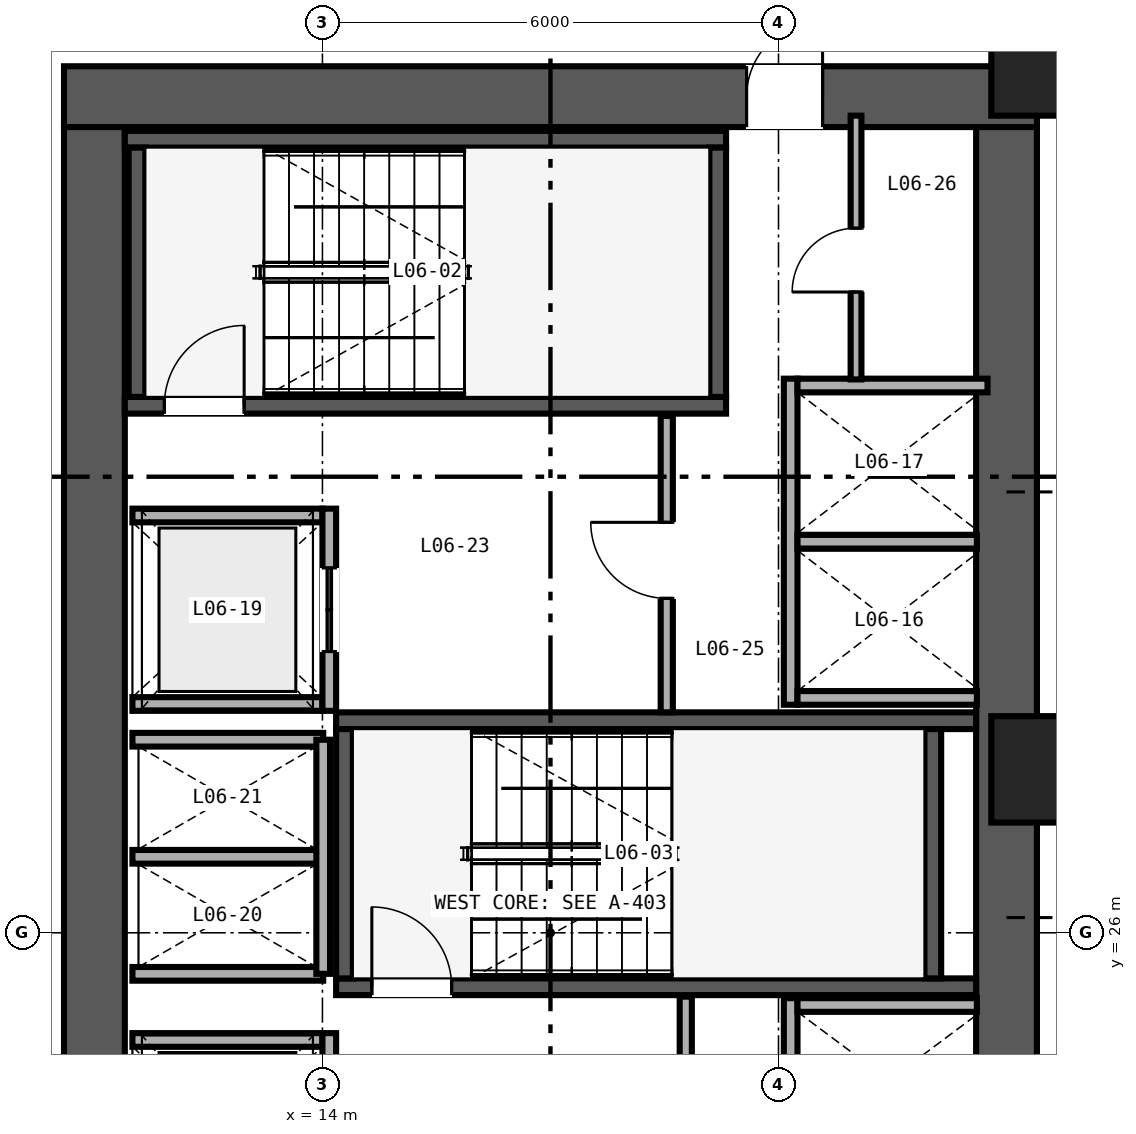
"""IFC4 building model, lengths in metres.
Left out: names, types, materials, properties, quantities, classifications, styles, units other than length and angle.
Written with IfcOpenShell. Run it as: python <this file> out.ifc"""

import sys

from ifc_helpers import new_model, si_unit, direction, frame, frame_2d, origin, origin_2d, place, context, subcontext, project, spatial, rectangle, extrude, source, transform, mapped, element, fill, save


model = new_model("IFC4")
c1 = context("Model", 3, precision=1e-05, world=origin(), true_north=direction((0.0, 1.0)))
c2 = subcontext(c1, "Body", "Model", "MODEL_VIEW")
j1 = project(units=[si_unit("LENGTHUNIT", "METRE"), si_unit("PLANEANGLEUNIT", "RADIAN")], contexts=[c1])
p1 = place(None, origin())
s1 = spatial("IfcSite", under=j1, at=p1, CompositionType="ELEMENT")
p2 = place(p1, origin())
s2 = spatial("IfcBuilding", under=s1, at=p2, CompositionType="ELEMENT")
p3 = place(p2, frame((0.0, 0.0, 28.8)))
s3 = spatial("IfcBuildingStorey", under=s2, at=p3, CompositionType="ELEMENT", Elevation=28.8)
p4 = place(p3, frame((10.6, 37.0, 0.0), z_axis=(0.0, 0.0, 1.0), x_axis=(1.0, 0.0, 0.0)))
e1 = element("IfcWall", 1, at=p4, inside=s3, PredefinedType="SHEAR", context=c2, shape_type="SweptSolid", body=[
    extrude(rectangle(XDim=12.8, YDim=0.8, at=frame_2d((6.4, 0.0))), origin(), (0.0, 0.0, 1.0), 5.75),
])
p5 = place(p4, frame((8.98, 0.0, 0.0)))
e2 = element("IfcOpeningElement", 2, at=p5, cuts=e1, PredefinedType="OPENING", context=c2, shape_type="SweptSolid", body=[
    extrude(rectangle(XDim=1.0, YDim=2.15, at=frame_2d((0.5, 1.075))), frame((0.0, 0.41, 0.0), z_axis=(0.0, -1.0, 0.0), x_axis=(1.0, 0.0, 0.0)), (0.0, 0.0, 1.0), 0.82),
])
for number, where, z_axis, x_axis in (
    (3, (11.0, 15.4, 0.0), (0.0, 0.0, 1.0), (0.0, 1.0, 0.0)),
    (4, (23.0, 15.4, 0.0), (0.0, 0.0, 1.0), (0.0, 1.0, 0.0)),
):
    element("IfcWall", number, at=place(p3, frame(where, z_axis=z_axis, x_axis=x_axis)), inside=s3, PredefinedType="SHEAR", context=c2, shape_type="SweptSolid", body=[
        extrude(rectangle(XDim=21.2, YDim=0.8, at=frame_2d((10.6, 0.0))), origin(), (0.0, 0.0, 1.0), 5.75),
    ])
p6 = place(p3, frame((11.4, 32.94, 0.0), z_axis=(0.0, 0.0, 1.0), x_axis=(1.0, 0.0, 0.0)))
e5 = element("IfcWall", 5, at=p6, inside=s3, PredefinedType="SHEAR", context=c2, shape_type="SweptSolid", body=[
    extrude(rectangle(XDim=7.91, YDim=0.22, at=frame_2d((3.955, 0.0))), origin(), (0.0, 0.0, 1.0), 5.8),
])
p7 = place(p6, frame((0.52, 0.0, 0.0)))
e6 = element("IfcOpeningElement", 6, at=p7, cuts=e5, PredefinedType="OPENING", context=c2, shape_type="SweptSolid", body=[
    extrude(rectangle(XDim=1.05, YDim=2.15, at=frame_2d((0.525, 1.075))), frame((0.0, 0.12, 0.0), z_axis=(0.0, -1.0, 0.0), x_axis=(1.0, 0.0, 0.0)), (0.0, 0.0, 1.0), 0.24),
])
p8 = place(p3, frame((11.4, 36.44, 0.0), z_axis=(0.0, 0.0, 1.0), x_axis=(1.0, 0.0, 0.0)))
e7 = element("IfcWall", 7, at=p8, inside=s3, PredefinedType="SHEAR", context=c2, shape_type="SweptSolid", body=[
    extrude(rectangle(XDim=7.91, YDim=0.22, at=frame_2d((3.955, 0.0))), origin(), (0.0, 0.0, 1.0), 5.8),
])
for number, where, z_axis, x_axis in (
    (8, (11.56, 33.05, 0.0), (0.0, 0.0, 1.0), (0.0, 1.0, 0.0)),
    (9, (19.2, 33.05, 0.0), (0.0, 0.0, 1.0), (0.0, 1.0, 0.0)),
):
    element("IfcWall", number, at=place(p3, frame(where, z_axis=z_axis, x_axis=x_axis)), inside=s3, PredefinedType="SHEAR", context=c2, shape_type="SweptSolid", body=[
        extrude(rectangle(XDim=3.28, YDim=0.22, at=frame_2d((1.64, 0.0))), origin(), (0.0, 0.0, 1.0), 5.8),
    ])
p9 = place(p3, frame((14.18, 25.29, 0.0), z_axis=(0.0, 0.0, 1.0), x_axis=(1.0, 0.0, 0.0)))
e10 = element("IfcWall", 10, at=p9, inside=s3, PredefinedType="SHEAR", context=c2, shape_type="SweptSolid", body=[
    extrude(rectangle(XDim=8.42, YDim=0.22, at=frame_2d((4.21, 0.0))), origin(), (0.0, 0.0, 1.0), 5.8),
])
p10 = place(p9, frame((0.47, 0.0, 0.0)))
e11 = element("IfcOpeningElement", 11, at=p10, cuts=e10, PredefinedType="OPENING", context=c2, shape_type="SweptSolid", body=[
    extrude(rectangle(XDim=1.05, YDim=2.15, at=frame_2d((0.525, 1.075))), frame((0.0, 0.12, 0.0), z_axis=(0.0, -1.0, 0.0), x_axis=(1.0, 0.0, 0.0)), (0.0, 0.0, 1.0), 0.24),
])
p11 = place(p3, frame((14.18, 28.79, 0.0), z_axis=(0.0, 0.0, 1.0), x_axis=(1.0, 0.0, 0.0)))
e12 = element("IfcWall", 12, at=p11, inside=s3, PredefinedType="SHEAR", context=c2, shape_type="SweptSolid", body=[
    extrude(rectangle(XDim=8.42, YDim=0.22, at=frame_2d((4.21, 0.0))), origin(), (0.0, 0.0, 1.0), 5.8),
])
for number, where, z_axis, x_axis in (
    (13, (14.29, 25.4, 0.0), (0.0, 0.0, 1.0), (0.0, 1.0, 0.0)),
    (14, (22.03, 25.4, 0.0), (0.0, 0.0, 1.0), (0.0, 1.0, 0.0)),
):
    element("IfcWall", number, at=place(p3, frame(where, z_axis=z_axis, x_axis=x_axis)), inside=s3, PredefinedType="SHEAR", context=c2, shape_type="SweptSolid", body=[
        extrude(rectangle(XDim=3.28, YDim=0.22, at=frame_2d((1.64, 0.0))), origin(), (0.0, 0.0, 1.0), 5.8),
    ])
m1 = source(origin(), c2, "Body", "SweptSolid", [
    extrude(rectangle(XDim=1.4, YDim=1.4, at=origin_2d()), origin(), (0.0, 0.0, 1.0), 5.75),
])
for number, where, z_axis, x_axis in (
    (15, (23.5, 28.15, 0.0), (0.0, 0.0, 1.0), (1.0, 0.0, 0.0)),
    (16, (23.5, 37.45, 0.0), (0.0, 0.0, 1.0), (1.0, 0.0, 0.0)),
):
    element("IfcColumn", number, at=place(p3, frame(where, z_axis=z_axis, x_axis=x_axis)), inside=s3, PredefinedType="COLUMN", context=c2, shape_type="MappedRepresentation", body=[
        mapped(m1, transform((0.0, 0.0, 0.0), scale=1.0)),
    ])
p12 = place(p3, frame((20.16, 18.82, 0.0), z_axis=(0.0, 0.0, 1.0), x_axis=(0.0, 1.0, 0.0)))
e17 = element("IfcWall", 17, at=p12, inside=s3, PredefinedType="SOLIDWALL", context=c2, shape_type="SweptSolid", body=[
    extrude(rectangle(XDim=6.32, YDim=0.18, at=frame_2d((3.16, 0.0))), origin(), (0.0, 0.0, 1.0), 4.65),
])
p13 = place(p3, frame((20.25, 25.05, 0.0), z_axis=(0.0, 0.0, 1.0), x_axis=(1.0, 0.0, 0.0)))
e18 = element("IfcWall", 18, at=p13, inside=s3, PredefinedType="SOLIDWALL", context=c2, shape_type="SweptSolid", body=[
    extrude(rectangle(XDim=2.36, YDim=0.18, at=frame_2d((1.18, 0.0))), origin(), (0.0, 0.0, 1.0), 5.75),
])
p14 = place(p3, frame((20.16, 29.0, 0.0), z_axis=(0.0, 0.0, 1.0), x_axis=(0.0, 1.0, 0.0)))
e19 = element("IfcWall", 19, at=p14, inside=s3, PredefinedType="SOLIDWALL", context=c2, shape_type="SweptSolid", body=[
    extrude(rectangle(XDim=4.29, YDim=0.18, at=frame_2d((2.145, 0.0))), origin(), (0.0, 0.0, 1.0), 5.75),
])
p15 = place(p3, frame((20.25, 29.09, 0.0), z_axis=(0.0, 0.0, 1.0), x_axis=(1.0, 0.0, 0.0)))
e20 = element("IfcWall", 20, at=p15, inside=s3, PredefinedType="SOLIDWALL", context=c2, shape_type="SweptSolid", body=[
    extrude(rectangle(XDim=2.36, YDim=0.18, at=frame_2d((1.18, 0.0))), origin(), (0.0, 0.0, 1.0), 5.75),
])
p16 = place(p3, frame((20.25, 33.2, 0.0), z_axis=(0.0, 0.0, 1.0), x_axis=(1.0, 0.0, 0.0)))
e21 = element("IfcWall", 21, at=p16, inside=s3, PredefinedType="SOLIDWALL", context=c2, shape_type="SweptSolid", body=[
    extrude(rectangle(XDim=2.5, YDim=0.18, at=frame_2d((1.25, 0.0))), origin(), (0.0, 0.0, 1.0), 5.75),
])
p17 = place(p3, frame((20.25, 31.145, 0.0), z_axis=(0.0, 0.0, 1.0), x_axis=(1.0, 0.0, 0.0)))
e22 = element("IfcWall", 22, at=p17, inside=s3, PredefinedType="SOLIDWALL", context=c2, shape_type="SweptSolid", body=[
    extrude(rectangle(XDim=2.36, YDim=0.18, at=frame_2d((1.18, 0.0))), origin(), (0.0, 0.0, 1.0), 5.75),
])
p18 = place(p3, frame((11.5, 24.59, 0.0), z_axis=(0.0, 0.0, 1.0), x_axis=(1.0, 0.0, 0.0)))
e23 = element("IfcWall", 23, at=p18, inside=s3, PredefinedType="SOLIDWALL", context=c2, shape_type="SweptSolid", body=[
    extrude(rectangle(XDim=2.5, YDim=0.18, at=frame_2d((1.25, 0.0))), origin(), (0.0, 0.0, 1.0), 5.75),
])
p19 = place(p3, frame((14.09, 22.02, 0.0), z_axis=(0.0, 0.0, 1.0), x_axis=(0.0, 1.0, 0.0)))
e24 = element("IfcWall", 24, at=p19, inside=s3, PredefinedType="SOLIDWALL", context=c2, shape_type="SweptSolid", body=[
    extrude(rectangle(XDim=2.66, YDim=0.18, at=frame_2d((1.33, 0.0))), origin(), (0.0, 0.0, 1.0), 5.75),
])
p20 = place(p19, frame((0.78, 0.0, 0.0)))
e25 = element("IfcOpeningElement", 25, at=p20, cuts=e24, PredefinedType="OPENING", context=c2, shape_type="SweptSolid", body=[
    extrude(rectangle(XDim=1.1, YDim=2.2, at=frame_2d((0.55, 1.1))), frame((0.0, 0.1, 0.0), z_axis=(0.0, -1.0, 0.0), x_axis=(1.0, 0.0, 0.0)), (0.0, 0.0, 1.0), 0.2),
])
for number, where, z_axis, x_axis in (
    (26, (11.5, 29.01, 0.0), (0.0, 0.0, 1.0), (1.0, 0.0, 0.0)),
    (27, (11.5, 31.49, 0.0), (0.0, 0.0, 1.0), (1.0, 0.0, 0.0)),
):
    element("IfcWall", number, at=place(p3, frame(where, z_axis=z_axis, x_axis=x_axis)), inside=s3, PredefinedType="SOLIDWALL", context=c2, shape_type="SweptSolid", body=[
        extrude(rectangle(XDim=2.5, YDim=0.18, at=frame_2d((1.25, 0.0))), origin(), (0.0, 0.0, 1.0), 5.75),
    ])
p21 = place(p3, frame((14.09, 28.92, 0.0), z_axis=(0.0, 0.0, 1.0), x_axis=(0.0, 1.0, 0.0)))
e28 = element("IfcWall", 28, at=p21, inside=s3, PredefinedType="SOLIDWALL", context=c2, shape_type="SweptSolid", body=[
    extrude(rectangle(XDim=2.66, YDim=0.18, at=frame_2d((1.33, 0.0))), origin(), (0.0, 0.0, 1.0), 5.75),
])
p22 = place(p21, frame((0.78, 0.0, 0.0)))
e29 = element("IfcOpeningElement", 29, at=p22, cuts=e28, PredefinedType="OPENING", context=c2, shape_type="SweptSolid", body=[
    extrude(rectangle(XDim=1.1, YDim=2.2, at=frame_2d((0.55, 1.1))), frame((0.0, 0.1, 0.0), z_axis=(0.0, -1.0, 0.0), x_axis=(1.0, 0.0, 0.0)), (0.0, 0.0, 1.0), 0.2),
])
for number, where, z_axis, x_axis in (
    (30, (11.5, 25.46, 0.0), (0.0, 0.0, 1.0), (1.0, 0.0, 0.0)),
    (31, (11.5, 27.0, 0.0), (0.0, 0.0, 1.0), (1.0, 0.0, 0.0)),
    (32, (11.5, 28.54, 0.0), (0.0, 0.0, 1.0), (1.0, 0.0, 0.0)),
):
    element("IfcWall", number, at=place(p3, frame(where, z_axis=z_axis, x_axis=x_axis)), inside=s3, PredefinedType="SOLIDWALL", context=c2, shape_type="SweptSolid", body=[
        extrude(rectangle(XDim=2.51, YDim=0.18, at=frame_2d((1.255, 0.0))), origin(), (0.0, 0.0, 1.0), 5.75),
    ])
p23 = place(p3, frame((14.01, 25.46, 0.0), z_axis=(0.0, 0.0, 1.0), x_axis=(0.0, 1.0, 0.0)))
e33 = element("IfcWall", 33, at=p23, inside=s3, PredefinedType="SOLIDWALL", context=c2, shape_type="SweptSolid", body=[
    extrude(rectangle(XDim=3.08, YDim=0.18, at=frame_2d((1.54, 0.0))), origin(), (0.0, 0.0, 1.0), 5.75),
])
p24 = place(p3, frame((18.78, 21.35, 0.0), z_axis=(0.0, 0.0, 1.0), x_axis=(0.0, 1.0, 0.0)))
e34 = element("IfcWall", 34, at=p24, inside=s3, PredefinedType="PARTITIONING", context=c2, shape_type="SweptSolid", body=[
    extrude(rectangle(XDim=3.81, YDim=0.16, at=frame_2d((1.905, 0.0))), origin(), (0.0, 0.0, 1.0), 5.75),
])
p25 = place(p3, frame((18.53, 28.9, 0.0), z_axis=(0.0, 0.0, 1.0), x_axis=(0.0, 1.0, 0.0)))
e35 = element("IfcWall", 35, at=p25, inside=s3, PredefinedType="PARTITIONING", context=c2, shape_type="SweptSolid", body=[
    extrude(rectangle(XDim=3.9, YDim=0.16, at=frame_2d((1.95, 0.0))), origin(), (0.0, 0.0, 1.0), 5.75),
])
p26 = place(p25, frame((1.5, 0.0, 0.0)))
e36 = element("IfcOpeningElement", 36, at=p26, cuts=e35, PredefinedType="OPENING", context=c2, shape_type="SweptSolid", body=[
    extrude(rectangle(XDim=1.0, YDim=2.15, at=frame_2d((0.5, 1.075))), frame((0.0, 0.09, 0.0), z_axis=(0.0, -1.0, 0.0), x_axis=(1.0, 0.0, 0.0)), (0.0, 0.0, 1.0), 0.18),
])
p27 = place(p3, frame((21.02, 33.28, 0.0), z_axis=(0.0, 0.0, 1.0), x_axis=(0.0, 1.0, 0.0)))
e37 = element("IfcWall", 37, at=p27, inside=s3, PredefinedType="PARTITIONING", context=c2, shape_type="SweptSolid", body=[
    extrude(rectangle(XDim=3.47, YDim=0.142, at=frame_2d((1.735, 0.0))), origin(), (0.0, 0.0, 1.0), 5.75),
])
p28 = place(p27, frame((1.15, 0.0, 0.0)))
e38 = element("IfcOpeningElement", 38, at=p28, cuts=e37, PredefinedType="OPENING", context=c2, shape_type="SweptSolid", body=[
    extrude(rectangle(XDim=0.84, YDim=2.1, at=frame_2d((0.42, 1.05))), frame((0.0, 0.081, 0.0), z_axis=(0.0, -1.0, 0.0), x_axis=(1.0, 0.0, 0.0)), (0.0, 0.0, 1.0), 0.162),
])
m2 = source(origin(), c2, "Body", "SweptSolid", [
    extrude(rectangle(XDim=1.05, YDim=2.15, at=frame_2d((0.525, 1.075))), frame((0.0, 0.025, 0.0), z_axis=(0.0, -1.0, 0.0), x_axis=(1.0, 0.0, 0.0)), (0.0, 0.0, 1.0), 0.05),
])
p29 = place(p7, origin())
e39 = element("IfcDoor", 39, at=p29, inside=s3, OperationType="SINGLE_SWING_RIGHT", PredefinedType="DOOR", context=c2, shape_type="MappedRepresentation", body=[
    mapped(m2, transform((0.0, 0.0, 0.0), scale=1.0)),
])
fill(e6, e39)
p30 = place(p10, origin())
e40 = element("IfcDoor", 40, at=p30, inside=s3, OperationType="SINGLE_SWING_LEFT", PredefinedType="DOOR", context=c2, shape_type="MappedRepresentation", body=[
    mapped(m2, transform((0.0, 0.0, 0.0), scale=1.0)),
])
fill(e11, e40)
m3 = source(origin(), c2, "Body", "SweptSolid", [
    extrude(rectangle(XDim=1.1, YDim=2.2, at=frame_2d((0.55, 1.1))), frame((0.0, 0.025, 0.0), z_axis=(0.0, -1.0, 0.0), x_axis=(1.0, 0.0, 0.0)), (0.0, 0.0, 1.0), 0.05),
])
p31 = place(p22, origin())
e41 = element("IfcDoor", 41, at=p31, inside=s3, OperationType="DOUBLE_DOOR_SLIDING", PredefinedType="DOOR", context=c2, shape_type="MappedRepresentation", body=[
    mapped(m3, transform((0.0, 0.0, 0.0), scale=1.0)),
])
fill(e29, e41)
m4 = source(origin(), c2, "Body", "SweptSolid", [
    extrude(rectangle(XDim=1.0, YDim=2.15, at=frame_2d((0.5, 1.075))), frame((0.0, 0.025, 0.0), z_axis=(0.0, -1.0, 0.0), x_axis=(1.0, 0.0, 0.0)), (0.0, 0.0, 1.0), 0.05),
])
p32 = place(p26, origin())
e42 = element("IfcDoor", 42, at=p32, inside=s3, OperationType="SINGLE_SWING_RIGHT", PredefinedType="DOOR", context=c2, shape_type="MappedRepresentation", body=[
    mapped(m4, transform((0.0, 0.0, 0.0), scale=1.0)),
])
fill(e36, e42)
m5 = source(origin(), c2, "Body", "SweptSolid", [
    extrude(rectangle(XDim=0.84, YDim=2.1, at=frame_2d((0.42, 1.05))), frame((0.0, 0.025, 0.0), z_axis=(0.0, -1.0, 0.0), x_axis=(1.0, 0.0, 0.0)), (0.0, 0.0, 1.0), 0.05),
])
p33 = place(p28, origin())
e43 = element("IfcDoor", 43, at=p33, inside=s3, OperationType="SINGLE_SWING_LEFT", PredefinedType="DOOR", context=c2, shape_type="MappedRepresentation", body=[
    mapped(m5, transform((0.0, 0.0, 0.0), scale=1.0)),
])
fill(e38, e43)
p34 = place(p5, origin())
e44 = element("IfcDoor", 44, at=p34, inside=s3, OperationType="SINGLE_SWING_RIGHT", PredefinedType="DOOR", context=c2, shape_type="MappedRepresentation", body=[
    mapped(m4, transform((0.0, 0.0, 0.0), scale=1.0)),
])
fill(e2, e44)
save(model, sys.argv[1])
